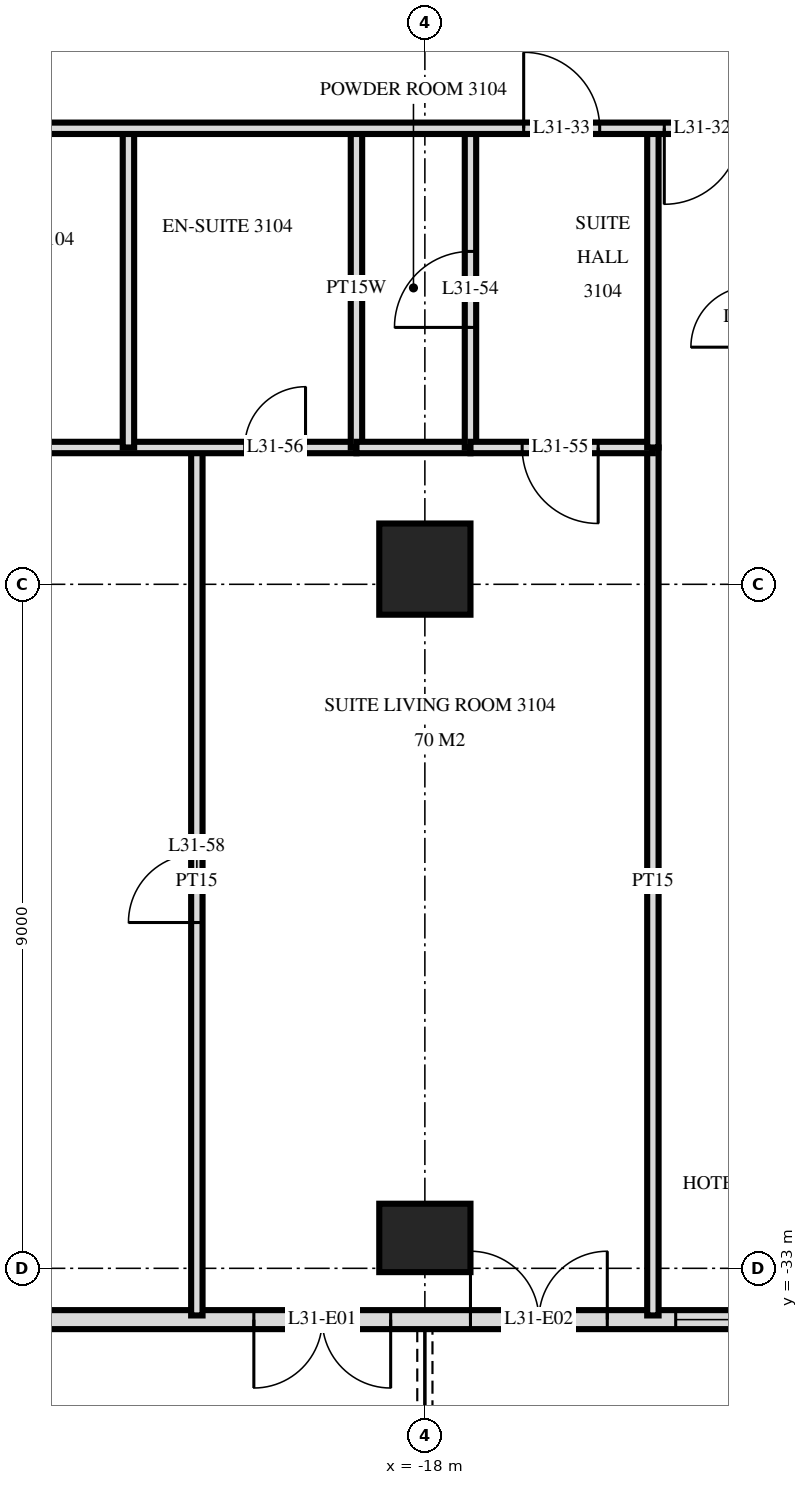
"""IFC4 building model, lengths in metres.
Left out: names, types, materials, properties, quantities, classifications, styles, units other than length and angle.
Written with IfcOpenShell. Run it as: python <this file> out.ifc"""

import sys

from ifc_helpers import new_model, si_unit, direction, frame, frame_2d, origin, origin_2d, place, context, subcontext, project, spatial, rectangle, extrude, element, fill, save


model = new_model("IFC4")
c1 = context("Model", 3, precision=1e-05, world=origin(), true_north=direction((0.0, 1.0)))
c2 = subcontext(c1, "Body", "Model", "MODEL_VIEW")
j1 = project(units=[si_unit("LENGTHUNIT", "METRE"), si_unit("PLANEANGLEUNIT", "RADIAN")], contexts=[c1])
p1 = place(None, origin())
s1 = spatial("IfcSite", under=j1, at=p1, CompositionType="ELEMENT")
p2 = place(p1, origin())
s2 = spatial("IfcBuilding", under=s1, at=p2, CompositionType="ELEMENT")
p3 = place(p2, frame((0.0, 0.0, 123.6)))
s3 = spatial("IfcBuildingStorey", under=s2, at=p3, CompositionType="ELEMENT", Elevation=123.6)
p4 = place(p3, frame((-18.0, -32.6, 0.0), z_axis=(0.0, 0.0, 1.0), x_axis=(1.0, 0.0, 0.0)))
e1 = element("IfcColumn", 1, at=p4, inside=s3, PredefinedType="COLUMN", context=c2, shape_type="SweptSolid", body=[
    extrude(rectangle(XDim=1.2, YDim=0.9, at=origin_2d()), origin(), (0.0, 0.0, 1.0), 3.6),
])
p5 = place(p3, frame((-18.0, -23.8, 0.0), z_axis=(0.0, 0.0, 1.0), x_axis=(1.0, 0.0, 0.0)))
e2 = element("IfcColumn", 2, at=p5, inside=s3, PredefinedType="COLUMN", context=c2, shape_type="SweptSolid", body=[
    extrude(rectangle(XDim=1.2, YDim=1.2, at=origin_2d()), origin(), (0.0, 0.0, 1.0), 3.6),
])
p6 = place(p3, frame((-23.675, -33.675, 0.0), z_axis=(0.0, 0.0, 1.0), x_axis=(1.0, 0.0, 0.0)))
e3 = element("IfcWall", 3, at=p6, inside=s3, PredefinedType="SOLIDWALL", context=c2, shape_type="SweptSolid", body=[
    extrude(rectangle(XDim=47.351, YDim=0.25, at=frame_2d((23.675, 0.0))), origin(), (0.0, 0.0, 1.0), 3.32),
])
p7 = place(p6, frame((3.425, 0.0, 0.0)))
e4 = element("IfcOpeningElement", 4, at=p7, cuts=e3, PredefinedType="OPENING", context=c2, shape_type="SweptSolid", body=[
    extrude(rectangle(XDim=1.8, YDim=2.4, at=frame_2d((0.9, 1.2))), frame((0.0, 0.135, 0.0), z_axis=(0.0, -1.0, 0.0), x_axis=(1.0, 0.0, 0.0)), (0.0, 0.0, 1.0), 0.27),
])
p8 = place(p6, frame((6.275, 0.0, 0.0)))
e5 = element("IfcOpeningElement", 5, at=p8, cuts=e3, PredefinedType="OPENING", context=c2, shape_type="SweptSolid", body=[
    extrude(rectangle(XDim=1.8, YDim=2.4, at=frame_2d((0.9, 1.2))), frame((0.0, 0.135, 0.0), z_axis=(0.0, -1.0, 0.0), x_axis=(1.0, 0.0, 0.0)), (0.0, 0.0, 1.0), 0.27),
])
p9 = place(p6, frame((8.975, 0.0, 0.3)))
e6 = element("IfcOpeningElement", 6, at=p9, cuts=e3, PredefinedType="OPENING", context=c2, shape_type="SweptSolid", body=[
    extrude(rectangle(XDim=2.4, YDim=2.1, at=frame_2d((1.2, 1.05))), frame((0.0, 0.135, 0.0), z_axis=(0.0, -1.0, 0.0), x_axis=(1.0, 0.0, 0.0)), (0.0, 0.0, 1.0), 0.27),
])
p10 = place(p6, frame((12.275, 0.0, 0.0)))
e7 = element("IfcOpeningElement", 7, at=p10, cuts=e3, PredefinedType="OPENING", context=c2, shape_type="SweptSolid", body=[
    extrude(rectangle(XDim=1.8, YDim=2.4, at=frame_2d((0.9, 1.2))), frame((0.0, 0.135, 0.0), z_axis=(0.0, -1.0, 0.0), x_axis=(1.0, 0.0, 0.0)), (0.0, 0.0, 1.0), 0.27),
])
p11 = place(p6, frame((14.975, 0.0, 0.3)))
e8 = element("IfcOpeningElement", 8, at=p11, cuts=e3, PredefinedType="OPENING", context=c2, shape_type="SweptSolid", body=[
    extrude(rectangle(XDim=2.4, YDim=2.1, at=frame_2d((1.2, 1.05))), frame((0.0, 0.135, 0.0), z_axis=(0.0, -1.0, 0.0), x_axis=(1.0, 0.0, 0.0)), (0.0, 0.0, 1.0), 0.27),
])
p12 = place(p6, frame((17.975, 0.0, 0.3)))
e9 = element("IfcOpeningElement", 9, at=p12, cuts=e3, PredefinedType="OPENING", context=c2, shape_type="SweptSolid", body=[
    extrude(rectangle(XDim=2.4, YDim=2.1, at=frame_2d((1.2, 1.05))), frame((0.0, 0.135, 0.0), z_axis=(0.0, -1.0, 0.0), x_axis=(1.0, 0.0, 0.0)), (0.0, 0.0, 1.0), 0.27),
])
p13 = place(p6, frame((21.275, 0.0, 0.0)))
e10 = element("IfcOpeningElement", 10, at=p13, cuts=e3, PredefinedType="OPENING", context=c2, shape_type="SweptSolid", body=[
    extrude(rectangle(XDim=1.8, YDim=2.4, at=frame_2d((0.9, 1.2))), frame((0.0, 0.135, 0.0), z_axis=(0.0, -1.0, 0.0), x_axis=(1.0, 0.0, 0.0)), (0.0, 0.0, 1.0), 0.27),
])
p14 = place(p6, frame((24.275, 0.0, 0.0)))
e11 = element("IfcOpeningElement", 11, at=p14, cuts=e3, PredefinedType="OPENING", context=c2, shape_type="SweptSolid", body=[
    extrude(rectangle(XDim=1.8, YDim=2.4, at=frame_2d((0.9, 1.2))), frame((0.0, 0.135, 0.0), z_axis=(0.0, -1.0, 0.0), x_axis=(1.0, 0.0, 0.0)), (0.0, 0.0, 1.0), 0.27),
])
p15 = place(p6, frame((26.975, 0.0, 0.3)))
e12 = element("IfcOpeningElement", 12, at=p15, cuts=e3, PredefinedType="OPENING", context=c2, shape_type="SweptSolid", body=[
    extrude(rectangle(XDim=2.4, YDim=2.1, at=frame_2d((1.2, 1.05))), frame((0.0, 0.135, 0.0), z_axis=(0.0, -1.0, 0.0), x_axis=(1.0, 0.0, 0.0)), (0.0, 0.0, 1.0), 0.27),
])
p16 = place(p6, frame((30.275, 0.0, 0.0)))
e13 = element("IfcOpeningElement", 13, at=p16, cuts=e3, PredefinedType="OPENING", context=c2, shape_type="SweptSolid", body=[
    extrude(rectangle(XDim=1.8, YDim=2.4, at=frame_2d((0.9, 1.2))), frame((0.0, 0.135, 0.0), z_axis=(0.0, -1.0, 0.0), x_axis=(1.0, 0.0, 0.0)), (0.0, 0.0, 1.0), 0.27),
])
p17 = place(p6, frame((32.975, 0.0, 0.3)))
e14 = element("IfcOpeningElement", 14, at=p17, cuts=e3, PredefinedType="OPENING", context=c2, shape_type="SweptSolid", body=[
    extrude(rectangle(XDim=2.4, YDim=2.1, at=frame_2d((1.2, 1.05))), frame((0.0, 0.135, 0.0), z_axis=(0.0, -1.0, 0.0), x_axis=(1.0, 0.0, 0.0)), (0.0, 0.0, 1.0), 0.27),
])
p18 = place(p6, frame((36.275, 0.0, 0.0)))
e15 = element("IfcOpeningElement", 15, at=p18, cuts=e3, PredefinedType="OPENING", context=c2, shape_type="SweptSolid", body=[
    extrude(rectangle(XDim=1.8, YDim=2.4, at=frame_2d((0.9, 1.2))), frame((0.0, 0.135, 0.0), z_axis=(0.0, -1.0, 0.0), x_axis=(1.0, 0.0, 0.0)), (0.0, 0.0, 1.0), 0.27),
])
p19 = place(p6, frame((38.975, 0.0, 0.3)))
e16 = element("IfcOpeningElement", 16, at=p19, cuts=e3, PredefinedType="OPENING", context=c2, shape_type="SweptSolid", body=[
    extrude(rectangle(XDim=2.4, YDim=2.1, at=frame_2d((1.2, 1.05))), frame((0.0, 0.135, 0.0), z_axis=(0.0, -1.0, 0.0), x_axis=(1.0, 0.0, 0.0)), (0.0, 0.0, 1.0), 0.27),
])
p20 = place(p6, frame((41.975, 0.0, 0.3)))
e17 = element("IfcOpeningElement", 17, at=p20, cuts=e3, PredefinedType="OPENING", context=c2, shape_type="SweptSolid", body=[
    extrude(rectangle(XDim=2.4, YDim=2.1, at=frame_2d((1.2, 1.05))), frame((0.0, 0.135, 0.0), z_axis=(0.0, -1.0, 0.0), x_axis=(1.0, 0.0, 0.0)), (0.0, 0.0, 1.0), 0.27),
])
p21 = place(p6, frame((45.125, 0.0, 0.0)))
e18 = element("IfcOpeningElement", 18, at=p21, cuts=e3, PredefinedType="OPENING", context=c2, shape_type="SweptSolid", body=[
    extrude(rectangle(XDim=1.8, YDim=2.4, at=frame_2d((0.9, 1.2))), frame((0.0, 0.135, 0.0), z_axis=(0.0, -1.0, 0.0), x_axis=(1.0, 0.0, 0.0)), (0.0, 0.0, 1.0), 0.27),
])
p22 = place(p3, frame((-15.0, -22.2, 0.0), z_axis=(0.0, 0.0, 1.0), x_axis=(0.0, 1.0, 0.0)))
e19 = element("IfcWall", 19, at=p22, inside=s3, PredefinedType="PARTITIONING", context=c2, shape_type="SweptSolid", body=[
    extrude(rectangle(XDim=4.2, YDim=0.15, at=frame_2d((2.1, 0.0))), origin(), (0.0, 0.0, 1.0), 3.32),
])
p23 = place(p3, frame((-15.0, -33.62, 0.0), z_axis=(0.0, 0.0, 1.0), x_axis=(0.0, 1.0, 0.0)))
e20 = element("IfcWall", 20, at=p23, inside=s3, PredefinedType="PARTITIONING", context=c2, shape_type="SweptSolid", body=[
    extrude(rectangle(XDim=11.42, YDim=0.15, at=frame_2d((5.71, 0.0))), origin(), (0.0, 0.0, 1.0), 3.32),
])
p24 = place(p3, frame((-17.4, -22.2, 0.0), z_axis=(0.0, 0.0, 1.0), x_axis=(0.0, 1.0, 0.0)))
e21 = element("IfcWall", 21, at=p24, inside=s3, PredefinedType="PARTITIONING", context=c2, shape_type="SweptSolid", body=[
    extrude(rectangle(XDim=4.2, YDim=0.15, at=frame_2d((2.1, 0.0))), origin(), (0.0, 0.0, 1.0), 3.32),
])
p25 = place(p24, frame((1.58, 0.0, 0.0)))
e22 = element("IfcOpeningElement", 22, at=p25, cuts=e21, PredefinedType="OPENING", context=c2, shape_type="SweptSolid", body=[
    extrude(rectangle(XDim=1.0, YDim=2.1, at=frame_2d((0.5, 1.05))), frame((0.0, 0.085, 0.0), z_axis=(0.0, -1.0, 0.0), x_axis=(1.0, 0.0, 0.0)), (0.0, 0.0, 1.0), 0.17),
])
p26 = place(p3, frame((-18.9, -22.2, 0.0), z_axis=(0.0, 0.0, 1.0), x_axis=(0.0, 1.0, 0.0)))
e23 = element("IfcWall", 23, at=p26, inside=s3, PredefinedType="PLUMBINGWALL", context=c2, shape_type="SweptSolid", body=[
    extrude(rectangle(XDim=4.2, YDim=0.15, at=frame_2d((2.1, 0.0))), origin(), (0.0, 0.0, 1.0), 3.32),
])
p27 = place(p3, frame((-21.0, -33.62, 0.0), z_axis=(0.0, 0.0, 1.0), x_axis=(0.0, 1.0, 0.0)))
e24 = element("IfcWall", 24, at=p27, inside=s3, PredefinedType="PARTITIONING", context=c2, shape_type="SweptSolid", body=[
    extrude(rectangle(XDim=11.42, YDim=0.15, at=frame_2d((5.71, 0.0))), origin(), (0.0, 0.0, 1.0), 3.32),
])
p28 = place(p27, frame((5.17, 0.0, 0.0)))
e25 = element("IfcOpeningElement", 25, at=p28, cuts=e24, PredefinedType="OPENING", context=c2, shape_type="SweptSolid", body=[
    extrude(rectangle(XDim=0.9, YDim=2.1, at=frame_2d((0.45, 1.05))), frame((0.0, 0.085, 0.0), z_axis=(0.0, -1.0, 0.0), x_axis=(1.0, 0.0, 0.0)), (0.0, 0.0, 1.0), 0.17),
])
p29 = place(p3, frame((-21.9, -22.2, 0.0), z_axis=(0.0, 0.0, 1.0), x_axis=(0.0, 1.0, 0.0)))
e26 = element("IfcWall", 26, at=p29, inside=s3, PredefinedType="PARTITIONING", context=c2, shape_type="SweptSolid", body=[
    extrude(rectangle(XDim=4.2, YDim=0.15, at=frame_2d((2.1, 0.0))), origin(), (0.0, 0.0, 1.0), 3.32),
])
p30 = place(p3, frame((-17.4, -22.2, 0.0), z_axis=(0.0, 0.0, 1.0), x_axis=(1.0, 0.0, 0.0)))
e27 = element("IfcWall", 27, at=p30, inside=s3, PredefinedType="PARTITIONING", context=c2, shape_type="SweptSolid", body=[
    extrude(rectangle(XDim=2.4, YDim=0.15, at=frame_2d((1.2, 0.0))), origin(), (0.0, 0.0, 1.0), 3.32),
])
p31 = place(p30, frame((0.68, 0.0, 0.0)))
e28 = element("IfcOpeningElement", 28, at=p31, cuts=e27, PredefinedType="OPENING", context=c2, shape_type="SweptSolid", body=[
    extrude(rectangle(XDim=1.0, YDim=2.1, at=frame_2d((0.5, 1.05))), frame((0.0, 0.085, 0.0), z_axis=(0.0, -1.0, 0.0), x_axis=(1.0, 0.0, 0.0)), (0.0, 0.0, 1.0), 0.17),
])
p32 = place(p3, frame((-28.02, -22.2, 0.0), z_axis=(0.0, 0.0, 1.0), x_axis=(1.0, 0.0, 0.0)))
e29 = element("IfcWall", 29, at=p32, inside=s3, PredefinedType="PARTITIONING", context=c2, shape_type="SweptSolid", body=[
    extrude(rectangle(XDim=9.12, YDim=0.15, at=frame_2d((4.56, 0.0))), origin(), (0.0, 0.0, 1.0), 3.32),
])
p33 = place(p32, frame((7.65, 0.0, 0.0)))
e30 = element("IfcOpeningElement", 30, at=p33, cuts=e29, PredefinedType="OPENING", context=c2, shape_type="SweptSolid", body=[
    extrude(rectangle(XDim=0.8, YDim=2.1, at=frame_2d((0.4, 1.05))), frame((0.0, 0.085, 0.0), z_axis=(0.0, -1.0, 0.0), x_axis=(1.0, 0.0, 0.0)), (0.0, 0.0, 1.0), 0.17),
])
p34 = place(p32, frame((2.5, 0.0, 0.0)))
e31 = element("IfcOpeningElement", 31, at=p34, cuts=e29, PredefinedType="OPENING", context=c2, shape_type="SweptSolid", body=[
    extrude(rectangle(XDim=0.9, YDim=2.1, at=frame_2d((0.45, 1.05))), frame((0.0, 0.085, 0.0), z_axis=(0.0, -1.0, 0.0), x_axis=(1.0, 0.0, 0.0)), (0.0, 0.0, 1.0), 0.17),
])
p35 = place(p3, frame((-18.9, -22.2, 0.0), z_axis=(0.0, 0.0, 1.0), x_axis=(1.0, 0.0, 0.0)))
e32 = element("IfcWall", 32, at=p35, inside=s3, PredefinedType="PLUMBINGWALL", context=c2, shape_type="SweptSolid", body=[
    extrude(rectangle(XDim=1.5, YDim=0.15, at=frame_2d((0.75, 0.0))), origin(), (0.0, 0.0, 1.0), 3.32),
])
p36 = place(p3, frame((-28.02, -18.0, 0.0), z_axis=(0.0, 0.0, 1.0), x_axis=(1.0, 0.0, 0.0)))
e33 = element("IfcWall", 33, at=p36, inside=s3, PredefinedType="PARTITIONING", context=c2, shape_type="SweptSolid", body=[
    extrude(rectangle(XDim=56.04, YDim=0.15, at=frame_2d((28.02, 0.0))), origin(), (0.0, 0.0, 1.0), 3.32),
])
p37 = place(p36, frame((13.17, 0.0, 0.0)))
e34 = element("IfcOpeningElement", 34, at=p37, cuts=e33, PredefinedType="OPENING", context=c2, shape_type="SweptSolid", body=[
    extrude(rectangle(XDim=1.0, YDim=2.1, at=frame_2d((0.5, 1.05))), frame((0.0, 0.085, 0.0), z_axis=(0.0, -1.0, 0.0), x_axis=(1.0, 0.0, 0.0)), (0.0, 0.0, 1.0), 0.17),
])
p38 = place(p36, frame((11.32, 0.0, 0.0)))
e35 = element("IfcOpeningElement", 35, at=p38, cuts=e33, PredefinedType="OPENING", context=c2, shape_type="SweptSolid", body=[
    extrude(rectangle(XDim=1.0, YDim=2.1, at=frame_2d((0.5, 1.05))), frame((0.0, 0.085, 0.0), z_axis=(0.0, -1.0, 0.0), x_axis=(1.0, 0.0, 0.0)), (0.0, 0.0, 1.0), 0.17),
])
p39 = place(p36, frame((41.87, 0.0, 0.0)))
e36 = element("IfcOpeningElement", 36, at=p39, cuts=e33, PredefinedType="OPENING", context=c2, shape_type="SweptSolid", body=[
    extrude(rectangle(XDim=1.0, YDim=2.1, at=frame_2d((0.5, 1.05))), frame((0.0, 0.085, 0.0), z_axis=(0.0, -1.0, 0.0), x_axis=(1.0, 0.0, 0.0)), (0.0, 0.0, 1.0), 0.17),
])
p40 = place(p36, frame((43.17, 0.0, 0.0)))
e37 = element("IfcOpeningElement", 37, at=p40, cuts=e33, PredefinedType="OPENING", context=c2, shape_type="SweptSolid", body=[
    extrude(rectangle(XDim=1.0, YDim=2.1, at=frame_2d((0.5, 1.05))), frame((0.0, 0.085, 0.0), z_axis=(0.0, -1.0, 0.0), x_axis=(1.0, 0.0, 0.0)), (0.0, 0.0, 1.0), 0.17),
])
p41 = place(p36, frame((46.72, 0.0, 0.0)))
e38 = element("IfcOpeningElement", 38, at=p41, cuts=e33, PredefinedType="OPENING", context=c2, shape_type="SweptSolid", body=[
    extrude(rectangle(XDim=1.0, YDim=2.1, at=frame_2d((0.5, 1.05))), frame((0.0, 0.085, 0.0), z_axis=(0.0, -1.0, 0.0), x_axis=(1.0, 0.0, 0.0)), (0.0, 0.0, 1.0), 0.17),
])
p42 = place(p36, frame((21.52, 0.0, 0.0)))
e39 = element("IfcOpeningElement", 39, at=p42, cuts=e33, PredefinedType="OPENING", context=c2, shape_type="SweptSolid", body=[
    extrude(rectangle(XDim=1.0, YDim=2.1, at=frame_2d((0.5, 1.05))), frame((0.0, 0.085, 0.0), z_axis=(0.0, -1.0, 0.0), x_axis=(1.0, 0.0, 0.0)), (0.0, 0.0, 1.0), 0.17),
])
p43 = place(p36, frame((33.52, 0.0, 0.0)))
e40 = element("IfcOpeningElement", 40, at=p43, cuts=e33, PredefinedType="OPENING", context=c2, shape_type="SweptSolid", body=[
    extrude(rectangle(XDim=1.0, YDim=2.1, at=frame_2d((0.5, 1.05))), frame((0.0, 0.085, 0.0), z_axis=(0.0, -1.0, 0.0), x_axis=(1.0, 0.0, 0.0)), (0.0, 0.0, 1.0), 0.17),
])
p44 = place(p7, frame((0.9, 0.0, 0.0), z_axis=(0.0, 0.0, 1.0), x_axis=(-1.0, 0.0, 0.0)))
e41 = element("IfcDoor", 41, at=p44, inside=s3, OperationType="DOUBLE_DOOR_SINGLE_SWING", PredefinedType="DOOR", context=c2, shape_type="SweptSolid", body=[
    extrude(rectangle(XDim=1.8, YDim=2.4, at=frame_2d((0.0, 1.2))), frame((0.0, -0.025, 0.0), z_axis=(0.0, 1.0, 0.0), x_axis=(-1.0, 0.0, 0.0)), (0.0, 0.0, 1.0), 0.05),
])
fill(e4, e41)
p45 = place(p8, origin())
e42 = element("IfcDoor", 42, at=p45, inside=s3, OperationType="DOUBLE_DOOR_SINGLE_SWING", PredefinedType="DOOR", context=c2, shape_type="SweptSolid", body=[
    extrude(rectangle(XDim=1.8, YDim=2.4, at=frame_2d((0.9, 1.2))), frame((0.0, 0.025, 0.0), z_axis=(0.0, -1.0, 0.0), x_axis=(1.0, 0.0, 0.0)), (0.0, 0.0, 1.0), 0.05),
])
fill(e5, e42)
p46 = place(p9, origin())
e43 = element("IfcWindow", 43, at=p46, inside=s3, PartitioningType="SINGLE_PANEL", PredefinedType="WINDOW", context=c2, shape_type="SweptSolid", body=[
    extrude(rectangle(XDim=2.4, YDim=2.1, at=frame_2d((1.2, 1.05))), frame((0.0, 0.03, 0.0), z_axis=(0.0, -1.0, 0.0), x_axis=(1.0, 0.0, 0.0)), (0.0, 0.0, 1.0), 0.06),
])
fill(e6, e43)
p47 = place(p37, frame((0.5, 0.0, 0.0), z_axis=(0.0, 0.0, 1.0), x_axis=(-1.0, 0.0, 0.0)))
e44 = element("IfcDoor", 44, at=p47, inside=s3, OperationType="SINGLE_SWING_LEFT", PredefinedType="DOOR", context=c2, shape_type="SweptSolid", body=[
    extrude(rectangle(XDim=1.0, YDim=2.1, at=frame_2d((0.0, 1.05))), frame((0.0, -0.025, 0.0), z_axis=(0.0, 1.0, 0.0), x_axis=(-1.0, 0.0, 0.0)), (0.0, 0.0, 1.0), 0.05),
])
fill(e34, e44)
p48 = place(p38, origin())
e45 = element("IfcDoor", 45, at=p48, inside=s3, OperationType="SINGLE_SWING_RIGHT", PredefinedType="DOOR", context=c2, shape_type="SweptSolid", body=[
    extrude(rectangle(XDim=1.0, YDim=2.1, at=frame_2d((0.5, 1.05))), frame((0.0, 0.025, 0.0), z_axis=(0.0, -1.0, 0.0), x_axis=(1.0, 0.0, 0.0)), (0.0, 0.0, 1.0), 0.05),
])
fill(e35, e45)
p49 = place(p25, origin())
e46 = element("IfcDoor", 46, at=p49, inside=s3, OperationType="SINGLE_SWING_RIGHT", PredefinedType="DOOR", context=c2, shape_type="SweptSolid", body=[
    extrude(rectangle(XDim=1.0, YDim=2.1, at=frame_2d((0.5, 1.05))), frame((0.0, 0.025, 0.0), z_axis=(0.0, -1.0, 0.0), x_axis=(1.0, 0.0, 0.0)), (0.0, 0.0, 1.0), 0.05),
])
fill(e22, e46)
p50 = place(p31, frame((0.5, 0.0, 0.0), z_axis=(0.0, 0.0, 1.0), x_axis=(-1.0, 0.0, 0.0)))
e47 = element("IfcDoor", 47, at=p50, inside=s3, OperationType="SINGLE_SWING_RIGHT", PredefinedType="DOOR", context=c2, shape_type="SweptSolid", body=[
    extrude(rectangle(XDim=1.0, YDim=2.1, at=frame_2d((0.0, 1.05))), frame((0.0, -0.025, 0.0), z_axis=(0.0, 1.0, 0.0), x_axis=(-1.0, 0.0, 0.0)), (0.0, 0.0, 1.0), 0.05),
])
fill(e28, e47)
p51 = place(p33, origin())
e48 = element("IfcDoor", 48, at=p51, inside=s3, OperationType="SINGLE_SWING_LEFT", PredefinedType="DOOR", context=c2, shape_type="SweptSolid", body=[
    extrude(rectangle(XDim=0.8, YDim=2.1, at=frame_2d((0.4, 1.05))), frame((0.0, 0.025, 0.0), z_axis=(0.0, -1.0, 0.0), x_axis=(1.0, 0.0, 0.0)), (0.0, 0.0, 1.0), 0.05),
])
fill(e30, e48)
p52 = place(p28, origin())
e49 = element("IfcDoor", 49, at=p52, inside=s3, OperationType="SINGLE_SWING_RIGHT", PredefinedType="DOOR", context=c2, shape_type="SweptSolid", body=[
    extrude(rectangle(XDim=0.9, YDim=2.1, at=frame_2d((0.45, 1.05))), frame((0.0, 0.025, 0.0), z_axis=(0.0, -1.0, 0.0), x_axis=(1.0, 0.0, 0.0)), (0.0, 0.0, 1.0), 0.05),
])
fill(e25, e49)
save(model, sys.argv[1])
